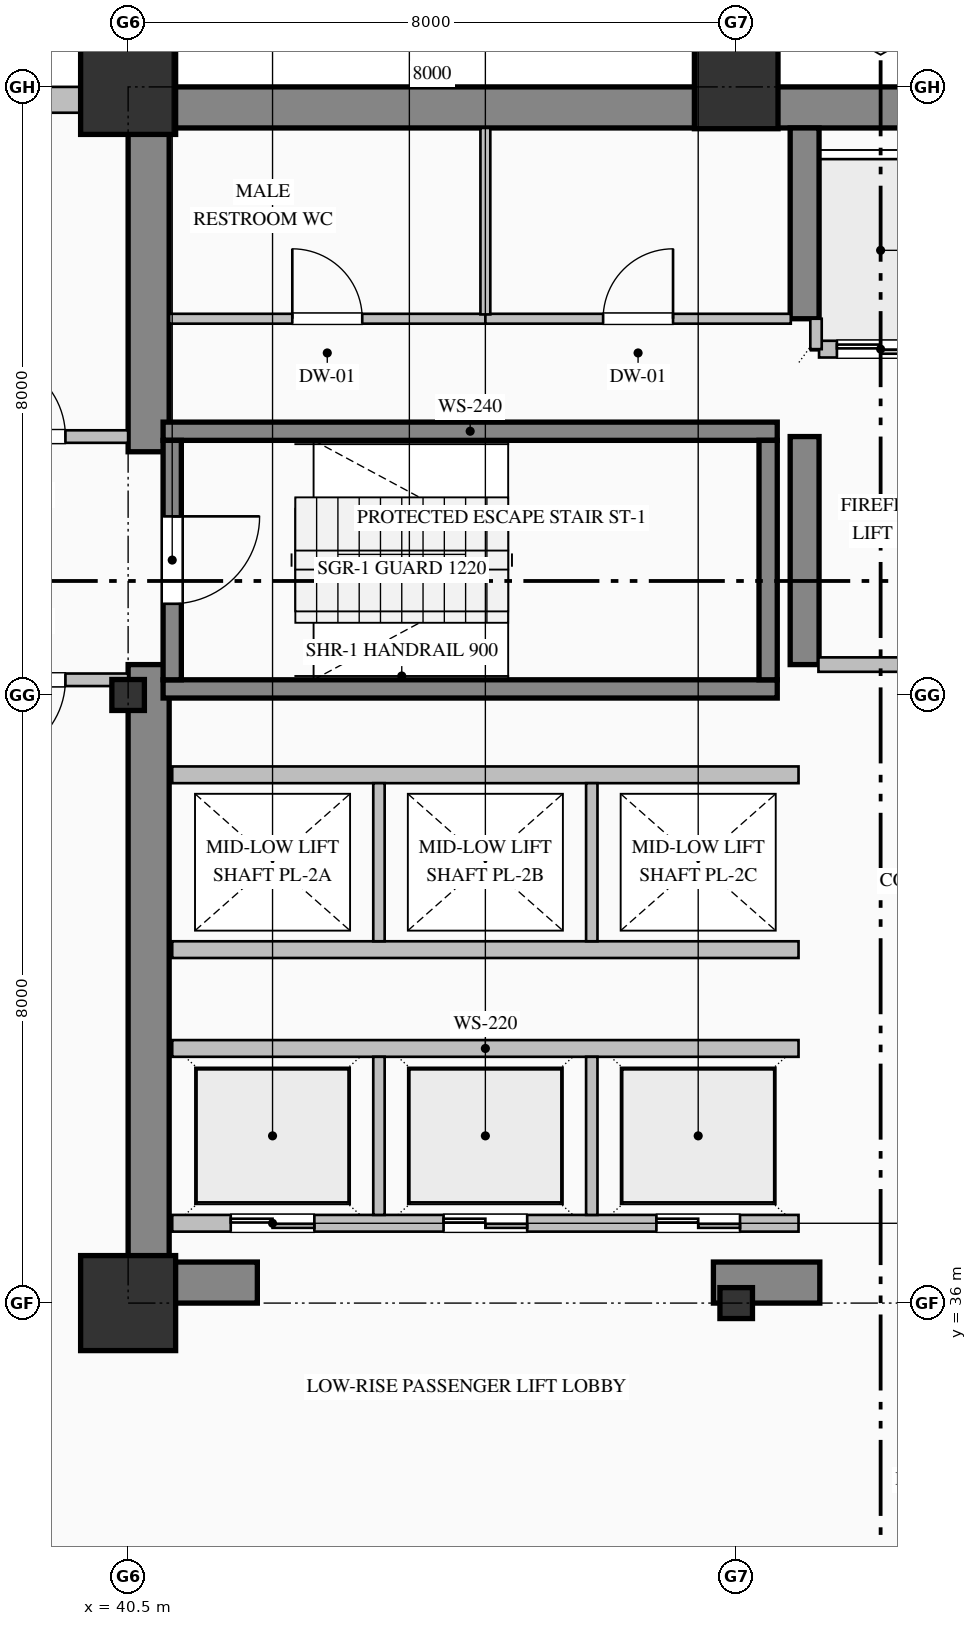
"""IFC4 building model, lengths in metres.
Left out: names, types, materials, properties, quantities, classifications, styles, units other than length and angle.
Written with IfcOpenShell. Run it as: python <this file> out.ifc"""

import sys

from ifc_helpers import new_model, si_unit, direction, frame, frame_2d, origin, origin_2d, place, context, subcontext, project, spatial, rectangle, hollow_rectangle, i_section, extrude, element, fill, save


model = new_model("IFC4")
c1 = context("Model", 3, precision=1e-05, world=origin(), true_north=direction((0.0, 1.0)))
c2 = subcontext(c1, "Body", "Model", "MODEL_VIEW")
j1 = project(units=[si_unit("LENGTHUNIT", "METRE"), si_unit("PLANEANGLEUNIT", "RADIAN")], contexts=[c1])
p1 = place(None, origin())
s1 = spatial("IfcSite", under=j1, at=p1, CompositionType="ELEMENT")
p2 = place(p1, origin())
s2 = spatial("IfcBuilding", under=s1, at=p2, CompositionType="ELEMENT")
p3 = place(p2, frame((0.0, 0.0, 68.2)))
s3 = spatial("IfcBuildingStorey", under=s2, at=p3, CompositionType="ELEMENT", Elevation=68.2)
p4 = place(p3, frame((40.5, 51.73, 0.0), z_axis=(0.0, 0.0, 1.0), x_axis=(1.0, 0.0, 0.0)))
e1 = element("IfcWall", 1, at=p4, inside=s3, PredefinedType="SHEAR", context=c2, shape_type="SweptSolid", body=[
    extrude(rectangle(XDim=23.5, YDim=0.54, at=frame_2d((11.75, 0.0))), origin(), (0.0, 0.0, 1.0), 3.75),
])
p5 = place(p3, frame((40.77, 36.54, 0.0), z_axis=(0.0, 0.0, 1.0), x_axis=(0.0, 1.0, 0.0)))
e2 = element("IfcWall", 2, at=p5, inside=s3, PredefinedType="SHEAR", context=c2, shape_type="SweptSolid", body=[
    extrude(rectangle(XDim=7.86, YDim=0.54, at=frame_2d((3.93, 0.0))), origin(), (0.0, 0.0, 1.0), 3.75),
])
p6 = place(p3, frame((40.77, 47.2, 0.0), z_axis=(0.0, 0.0, 1.0), x_axis=(0.0, 1.0, 0.0)))
e3 = element("IfcWall", 3, at=p6, inside=s3, PredefinedType="SHEAR", context=c2, shape_type="SweptSolid", body=[
    extrude(rectangle(XDim=4.26, YDim=0.54, at=frame_2d((2.13, 0.0))), origin(), (0.0, 0.0, 1.0), 3.75),
])
p7 = place(p3, frame((40.5, 36.27, 0.0), z_axis=(0.0, 0.0, 1.0), x_axis=(1.0, 0.0, 0.0)))
e4 = element("IfcWall", 4, at=p7, inside=s3, PredefinedType="SHEAR", context=c2, shape_type="SweptSolid", body=[
    extrude(rectangle(XDim=1.7, YDim=0.54, at=frame_2d((0.85, 0.0))), origin(), (0.0, 0.0, 1.0), 3.75),
])
p8 = place(p3, frame((48.2, 36.27, 0.0), z_axis=(0.0, 0.0, 1.0), x_axis=(1.0, 0.0, 0.0)))
e5 = element("IfcWall", 5, at=p8, inside=s3, PredefinedType="SHEAR", context=c2, shape_type="SweptSolid", body=[
    extrude(rectangle(XDim=1.4, YDim=0.54, at=frame_2d((0.7, 0.0))), origin(), (0.0, 0.0, 1.0), 3.75),
])
p9 = place(p3, frame((49.4, 44.4, 0.0), z_axis=(0.0, 0.0, 1.0), x_axis=(0.0, 1.0, 0.0)))
e6 = element("IfcWall", 6, at=p9, inside=s3, PredefinedType="SHEAR", context=c2, shape_type="SweptSolid", body=[
    extrude(rectangle(XDim=3.0, YDim=0.38, at=frame_2d((1.5, 0.0))), origin(), (0.0, 0.0, 1.0), 3.75),
])
p10 = place(p3, frame((49.4, 48.95, 0.0), z_axis=(0.0, 0.0, 1.0), x_axis=(0.0, 1.0, 0.0)))
e7 = element("IfcWall", 7, at=p10, inside=s3, PredefinedType="SHEAR", context=c2, shape_type="SweptSolid", body=[
    extrude(rectangle(XDim=2.51, YDim=0.38, at=frame_2d((1.255, 0.0))), origin(), (0.0, 0.0, 1.0), 3.75),
])
p11 = place(p3, frame((40.5, 36.0, 0.0), z_axis=(0.0, 0.0, 1.0), x_axis=(1.0, 0.0, 0.0)))
e8 = element("IfcColumn", 8, at=p11, inside=s3, PredefinedType="COLUMN", context=c2, shape_type="SweptSolid", body=[
    extrude(hollow_rectangle(XDim=1.25, YDim=1.25, WallThickness=0.045, at=origin_2d()), origin(), (0.0, 0.0, 1.0), 4.0),
])
p12 = place(p3, frame((40.5, 44.0, 0.0), z_axis=(0.0, 0.0, 1.0), x_axis=(1.0, 0.0, 0.0)))
e9 = element("IfcColumn", 9, at=p12, inside=s3, PredefinedType="COLUMN", context=c2, shape_type="SweptSolid", body=[
    extrude(i_section(OverallWidth=0.407, OverallDepth=0.428, WebThickness=0.02, FlangeThickness=0.035, FilletRadius=0.022, at=origin_2d()), origin(), (0.0, 0.0, 1.0), 4.0),
])
p13 = place(p3, frame((40.5, 52.0, 0.0), z_axis=(0.0, 0.0, 1.0), x_axis=(1.0, 0.0, 0.0)))
e10 = element("IfcColumn", 10, at=p13, inside=s3, PredefinedType="COLUMN", context=c2, shape_type="SweptSolid", body=[
    extrude(hollow_rectangle(XDim=1.25, YDim=1.25, WallThickness=0.045, at=origin_2d()), origin(), (0.0, 0.0, 1.0), 4.0),
])
p14 = place(p3, frame((48.5, 36.0, 0.0), z_axis=(0.0, 0.0, 1.0), x_axis=(1.0, 0.0, 0.0)))
e11 = element("IfcColumn", 11, at=p14, inside=s3, PredefinedType="COLUMN", context=c2, shape_type="SweptSolid", body=[
    extrude(i_section(OverallWidth=0.407, OverallDepth=0.428, WebThickness=0.02, FlangeThickness=0.035, FilletRadius=0.022, at=origin_2d()), origin(), (0.0, 0.0, 1.0), 4.0),
])
p15 = place(p3, frame((48.5, 52.0, 0.0), z_axis=(0.0, 0.0, 1.0), x_axis=(1.0, 0.0, 0.0)))
e12 = element("IfcColumn", 12, at=p15, inside=s3, PredefinedType="COLUMN", context=c2, shape_type="SweptSolid", body=[
    extrude(hollow_rectangle(XDim=1.1, YDim=1.1, WallThickness=0.04, at=origin_2d()), origin(), (0.0, 0.0, 1.0), 4.0),
])
p16 = place(p3, frame((4.0, 51.83, 0.0), z_axis=(0.0, 0.0, 1.0), x_axis=(1.0, 0.0, 0.0)))
e13 = element("IfcWall", 13, at=p16, inside=s3, PredefinedType="SOLIDWALL", context=c2, shape_type="SweptSolid", body=[
    extrude(rectangle(XDim=36.52, YDim=0.34, at=frame_2d((18.26, 0.0))), origin(), (0.0, 0.0, 1.0), 3.25),
])
p17 = place(p16, frame((6.15, 0.0, 0.85)))
e14 = element("IfcOpeningElement", 14, at=p17, cuts=e13, PredefinedType="OPENING", context=c2, shape_type="SweptSolid", body=[
    extrude(rectangle(XDim=2.1, YDim=2.05, at=frame_2d((1.05, 1.025))), frame((0.0, 0.18, 0.0), z_axis=(0.0, -1.0, 0.0), x_axis=(1.0, 0.0, 0.0)), (0.0, 0.0, 1.0), 0.36),
])
p18 = place(p16, frame((13.5, 0.0, 0.85)))
e15 = element("IfcOpeningElement", 15, at=p18, cuts=e13, PredefinedType="OPENING", context=c2, shape_type="SweptSolid", body=[
    extrude(rectangle(XDim=1.8, YDim=2.05, at=frame_2d((0.9, 1.025))), frame((0.0, 0.18, 0.0), z_axis=(0.0, -1.0, 0.0), x_axis=(1.0, 0.0, 0.0)), (0.0, 0.0, 1.0), 0.36),
])
p19 = place(p16, frame((16.95, 0.0, 0.85)))
e16 = element("IfcOpeningElement", 16, at=p19, cuts=e13, PredefinedType="OPENING", context=c2, shape_type="SweptSolid", body=[
    extrude(rectangle(XDim=2.1, YDim=2.05, at=frame_2d((1.05, 1.025))), frame((0.0, 0.18, 0.0), z_axis=(0.0, -1.0, 0.0), x_axis=(1.0, 0.0, 0.0)), (0.0, 0.0, 1.0), 0.36),
])
p20 = place(p16, frame((24.3, 0.0, 0.85)))
e17 = element("IfcOpeningElement", 17, at=p20, cuts=e13, PredefinedType="OPENING", context=c2, shape_type="SweptSolid", body=[
    extrude(rectangle(XDim=1.8, YDim=2.05, at=frame_2d((0.9, 1.025))), frame((0.0, 0.18, 0.0), z_axis=(0.0, -1.0, 0.0), x_axis=(1.0, 0.0, 0.0)), (0.0, 0.0, 1.0), 0.36),
])
for number, where, z_axis, x_axis in (
    (18, (40.96, 47.47, 0.0), (0.0, 0.0, 1.0), (1.0, 0.0, 0.0)),
    (19, (49.04, 44.08, 0.0), (0.0, 0.0, 1.0), (-1.0, 0.0, 0.0)),
):
    element("IfcWall", number, at=place(p3, frame(where, z_axis=z_axis, x_axis=x_axis)), inside=s3, PredefinedType="SOLIDWALL", context=c2, shape_type="SweptSolid", body=[
        extrude(rectangle(XDim=8.08, YDim=0.24, at=frame_2d((4.04, 0.0))), origin(), (0.0, 0.0, 1.0), 4.0),
    ])
p21 = place(p3, frame((41.08, 47.35, 0.0), z_axis=(0.0, 0.0, 1.0), x_axis=(0.0, -1.0, 0.0)))
e20 = element("IfcWall", 20, at=p21, inside=s3, PredefinedType="SOLIDWALL", context=c2, shape_type="SweptSolid", body=[
    extrude(rectangle(XDim=3.15, YDim=0.24, at=frame_2d((1.575, 0.0))), origin(), (0.0, 0.0, 1.0), 4.0),
])
p22 = place(p21, frame((1.0, 0.0, 0.0)))
e21 = element("IfcOpeningElement", 21, at=p22, cuts=e20, PredefinedType="OPENING", context=c2, shape_type="SweptSolid", body=[
    extrude(rectangle(XDim=1.15, YDim=2.2, at=frame_2d((0.575, 1.1))), frame((0.0, 0.13, 0.0), z_axis=(0.0, -1.0, 0.0), x_axis=(1.0, 0.0, 0.0)), (0.0, 0.0, 1.0), 0.26),
])
p23 = place(p3, frame((48.92, 44.2, 0.0), z_axis=(0.0, 0.0, 1.0), x_axis=(0.0, 1.0, 0.0)))
e22 = element("IfcWall", 22, at=p23, inside=s3, PredefinedType="SOLIDWALL", context=c2, shape_type="SweptSolid", body=[
    extrude(rectangle(XDim=3.15, YDim=0.24, at=frame_2d((1.575, 0.0))), origin(), (0.0, 0.0, 1.0), 4.0),
])
p24 = place(p3, frame((54.71, 48.55, 0.0), z_axis=(0.0, 0.0, 1.0), x_axis=(-1.0, 0.0, 0.0)))
e23 = element("IfcWall", 23, at=p24, inside=s3, PredefinedType="PARTITIONING", context=c2, shape_type="SweptSolid", body=[
    extrude(rectangle(XDim=5.12, YDim=0.22, at=frame_2d((2.56, 0.0))), origin(), (0.0, 0.0, 1.0), 3.75),
])
p25 = place(p24, frame((3.735, 0.0, 0.0)))
e24 = element("IfcOpeningElement", 24, at=p25, cuts=e23, PredefinedType="OPENING", context=c2, shape_type="SweptSolid", body=[
    extrude(rectangle(XDim=1.15, YDim=2.2, at=frame_2d((0.575, 1.1))), frame((0.0, 0.12, 0.0), z_axis=(0.0, -1.0, 0.0), x_axis=(1.0, 0.0, 0.0)), (0.0, 0.0, 1.0), 0.24),
])
p26 = place(p24, frame((0.935, 0.0, 0.0)))
e25 = element("IfcOpeningElement", 25, at=p26, cuts=e23, PredefinedType="OPENING", context=c2, shape_type="SweptSolid", body=[
    extrude(rectangle(XDim=1.15, YDim=2.2, at=frame_2d((0.575, 1.1))), frame((0.0, 0.12, 0.0), z_axis=(0.0, -1.0, 0.0), x_axis=(1.0, 0.0, 0.0)), (0.0, 0.0, 1.0), 0.24),
])
p27 = place(p3, frame((49.55, 48.55, 0.0), z_axis=(0.0, 0.0, 1.0), x_axis=(0.0, 1.0, 0.0)))
e26 = element("IfcWall", 26, at=p27, inside=s3, PredefinedType="PARTITIONING", context=c2, shape_type="SweptSolid", body=[
    extrude(rectangle(XDim=0.4, YDim=0.15, at=frame_2d((0.2, 0.0))), origin(), (0.0, 0.0, 1.0), 3.75),
])
p28 = place(p3, frame((49.32, 37.05, 0.0), z_axis=(0.0, 0.0, 1.0), x_axis=(-1.0, 0.0, 0.0)))
e27 = element("IfcWall", 27, at=p28, inside=s3, PredefinedType="PARTITIONING", context=c2, shape_type="SweptSolid", body=[
    extrude(rectangle(XDim=8.24, YDim=0.22, at=frame_2d((4.12, 0.0))), origin(), (0.0, 0.0, 1.0), 3.75),
])
p29 = place(p28, frame((6.37, 0.0, 0.0)))
e28 = element("IfcOpeningElement", 28, at=p29, cuts=e27, PredefinedType="OPENING", context=c2, shape_type="SweptSolid", body=[
    extrude(rectangle(XDim=1.1, YDim=2.2, at=frame_2d((0.55, 1.1))), frame((0.0, 0.12, 0.0), z_axis=(0.0, -1.0, 0.0), x_axis=(1.0, 0.0, 0.0)), (0.0, 0.0, 1.0), 0.24),
])
p30 = place(p28, frame((3.57, 0.0, 0.0)))
e29 = element("IfcOpeningElement", 29, at=p30, cuts=e27, PredefinedType="OPENING", context=c2, shape_type="SweptSolid", body=[
    extrude(rectangle(XDim=1.1, YDim=2.2, at=frame_2d((0.55, 1.1))), frame((0.0, 0.12, 0.0), z_axis=(0.0, -1.0, 0.0), x_axis=(1.0, 0.0, 0.0)), (0.0, 0.0, 1.0), 0.24),
])
p31 = place(p28, frame((0.77, 0.0, 0.0)))
e30 = element("IfcOpeningElement", 30, at=p31, cuts=e27, PredefinedType="OPENING", context=c2, shape_type="SweptSolid", body=[
    extrude(rectangle(XDim=1.1, YDim=2.2, at=frame_2d((0.55, 1.1))), frame((0.0, 0.12, 0.0), z_axis=(0.0, -1.0, 0.0), x_axis=(1.0, 0.0, 0.0)), (0.0, 0.0, 1.0), 0.24),
])
p32 = place(p3, frame((41.08, 39.35, 0.0), z_axis=(0.0, 0.0, 1.0), x_axis=(1.0, 0.0, 0.0)))
e31 = element("IfcWall", 31, at=p32, inside=s3, PredefinedType="PARTITIONING", context=c2, shape_type="SweptSolid", body=[
    extrude(rectangle(XDim=8.24, YDim=0.22, at=frame_2d((4.12, 0.0))), origin(), (0.0, 0.0, 1.0), 3.75),
])
for number, where, z_axis, x_axis in (
    (32, (43.8, 37.16, 0.0), (0.0, 0.0, 1.0), (0.0, 1.0, 0.0)),
    (33, (46.6, 37.16, 0.0), (0.0, 0.0, 1.0), (0.0, 1.0, 0.0)),
):
    element("IfcWall", number, at=place(p3, frame(where, z_axis=z_axis, x_axis=x_axis)), inside=s3, PredefinedType="PARTITIONING", context=c2, shape_type="SweptSolid", body=[
        extrude(rectangle(XDim=2.08, YDim=0.15, at=frame_2d((1.04, 0.0))), origin(), (0.0, 0.0, 1.0), 3.75),
    ])
for number, where, z_axis, x_axis in (
    (34, (49.32, 40.65, 0.0), (0.0, 0.0, 1.0), (-1.0, 0.0, 0.0)),
    (35, (41.08, 42.95, 0.0), (0.0, 0.0, 1.0), (1.0, 0.0, 0.0)),
):
    element("IfcWall", number, at=place(p3, frame(where, z_axis=z_axis, x_axis=x_axis)), inside=s3, PredefinedType="PARTITIONING", context=c2, shape_type="SweptSolid", body=[
        extrude(rectangle(XDim=8.24, YDim=0.22, at=frame_2d((4.12, 0.0))), origin(), (0.0, 0.0, 1.0), 3.75),
    ])
for number, where, z_axis, x_axis in (
    (36, (43.8, 40.76, 0.0), (0.0, 0.0, 1.0), (0.0, 1.0, 0.0)),
    (37, (46.6, 40.76, 0.0), (0.0, 0.0, 1.0), (0.0, 1.0, 0.0)),
):
    element("IfcWall", number, at=place(p3, frame(where, z_axis=z_axis, x_axis=x_axis)), inside=s3, PredefinedType="PARTITIONING", context=c2, shape_type="SweptSolid", body=[
        extrude(rectangle(XDim=2.08, YDim=0.15, at=frame_2d((1.04, 0.0))), origin(), (0.0, 0.0, 1.0), 3.75),
    ])
p33 = place(p3, frame((37.8, 47.4, 0.0), z_axis=(0.0, 0.0, 1.0), x_axis=(1.0, 0.0, 0.0)))
e38 = element("IfcWall", 38, at=p33, inside=s3, PredefinedType="PARTITIONING", context=c2, shape_type="SweptSolid", body=[
    extrude(rectangle(XDim=2.7, YDim=0.165, at=frame_2d((1.35, 0.0))), origin(), (0.0, 0.0, 1.0), 3.75),
])
p34 = place(p33, frame((0.825, 0.0, 0.0)))
e39 = element("IfcOpeningElement", 39, at=p34, cuts=e38, PredefinedType="OPENING", context=c2, shape_type="SweptSolid", body=[
    extrude(rectangle(XDim=1.05, YDim=2.15, at=frame_2d((0.525, 1.075))), frame((0.0, 0.093, 0.0), z_axis=(0.0, -1.0, 0.0), x_axis=(1.0, 0.0, 0.0)), (0.0, 0.0, 1.0), 0.185),
])
p35 = place(p3, frame((40.5, 44.2, 0.0), z_axis=(0.0, 0.0, 1.0), x_axis=(-1.0, 0.0, 0.0)))
e40 = element("IfcWall", 40, at=p35, inside=s3, PredefinedType="PARTITIONING", context=c2, shape_type="SweptSolid", body=[
    extrude(rectangle(XDim=2.7, YDim=0.165, at=frame_2d((1.35, 0.0))), origin(), (0.0, 0.0, 1.0), 3.75),
])
p36 = place(p35, frame((0.825, 0.0, 0.0)))
e41 = element("IfcOpeningElement", 41, at=p36, cuts=e40, PredefinedType="OPENING", context=c2, shape_type="SweptSolid", body=[
    extrude(rectangle(XDim=1.05, YDim=2.15, at=frame_2d((0.525, 1.075))), frame((0.0, 0.093, 0.0), z_axis=(0.0, -1.0, 0.0), x_axis=(1.0, 0.0, 0.0)), (0.0, 0.0, 1.0), 0.185),
])
p37 = place(p3, frame((41.04, 48.95, 0.0), z_axis=(0.0, 0.0, 1.0), x_axis=(1.0, 0.0, 0.0)))
e42 = element("IfcWall", 42, at=p37, inside=s3, PredefinedType="PARTITIONING", context=c2, shape_type="SweptSolid", body=[
    extrude(rectangle(XDim=4.16, YDim=0.13, at=frame_2d((2.08, 0.0))), origin(), (0.0, 0.0, 1.0), 3.75),
])
p38 = place(p37, frame((1.62, 0.0, 0.0)))
e43 = element("IfcOpeningElement", 43, at=p38, cuts=e42, PredefinedType="OPENING", context=c2, shape_type="SweptSolid", body=[
    extrude(rectangle(XDim=0.92, YDim=2.15, at=frame_2d((0.46, 1.075))), frame((0.0, 0.075, 0.0), z_axis=(0.0, -1.0, 0.0), x_axis=(1.0, 0.0, 0.0)), (0.0, 0.0, 1.0), 0.15),
])
p39 = place(p3, frame((45.2, 48.95, 0.0), z_axis=(0.0, 0.0, 1.0), x_axis=(1.0, 0.0, 0.0)))
e44 = element("IfcWall", 44, at=p39, inside=s3, PredefinedType="PARTITIONING", context=c2, shape_type="SweptSolid", body=[
    extrude(rectangle(XDim=4.018, YDim=0.13, at=frame_2d((2.009, 0.0))), origin(), (0.0, 0.0, 1.0), 3.75),
])
p40 = place(p39, frame((1.549, 0.0, 0.0)))
e45 = element("IfcOpeningElement", 45, at=p40, cuts=e44, PredefinedType="OPENING", context=c2, shape_type="SweptSolid", body=[
    extrude(rectangle(XDim=0.92, YDim=2.15, at=frame_2d((0.46, 1.075))), frame((0.0, 0.075, 0.0), z_axis=(0.0, -1.0, 0.0), x_axis=(1.0, 0.0, 0.0)), (0.0, 0.0, 1.0), 0.15),
])
p41 = place(p3, frame((54.718, 44.4, 0.0), z_axis=(0.0, 0.0, 1.0), x_axis=(-1.0, 0.0, 0.0)))
e46 = element("IfcWall", 46, at=p41, inside=s3, PredefinedType="PARTITIONING", context=c2, shape_type="SweptSolid", body=[
    extrude(rectangle(XDim=5.136, YDim=0.19, at=frame_2d((2.568, 0.0))), origin(), (0.0, 0.0, 1.0), 3.75),
])
p42 = place(p41, frame((2.043, 0.0, 0.0)))
e47 = element("IfcOpeningElement", 47, at=p42, cuts=e46, PredefinedType="OPENING", context=c2, shape_type="SweptSolid", body=[
    extrude(rectangle(XDim=1.05, YDim=2.15, at=frame_2d((0.525, 1.075))), frame((0.0, 0.105, 0.0), z_axis=(0.0, -1.0, 0.0), x_axis=(1.0, 0.0, 0.0)), (0.0, 0.0, 1.0), 0.21),
])
p43 = place(p3, frame((45.2, 51.46, 0.0), z_axis=(0.0, 0.0, 1.0), x_axis=(0.0, -1.0, 0.0)))
e48 = element("IfcWall", 48, at=p43, inside=s3, PredefinedType="PARTITIONING", context=c2, shape_type="SweptSolid", body=[
    extrude(rectangle(XDim=2.453, YDim=0.13, at=frame_2d((1.227, 0.0))), origin(), (0.0, 0.0, 1.0), 3.75),
])
p44 = place(p22, origin())
e49 = element("IfcDoor", 49, at=p44, inside=s3, OperationType="SINGLE_SWING_LEFT", PredefinedType="DOOR", context=c2, shape_type="SweptSolid", body=[
    extrude(rectangle(XDim=1.15, YDim=2.2, at=frame_2d((0.575, 1.1))), frame((0.0, 0.025, 0.0), z_axis=(0.0, -1.0, 0.0), x_axis=(1.0, 0.0, 0.0)), (0.0, 0.0, 1.0), 0.05),
])
fill(e21, e49)
p45 = place(p25, origin())
e50 = element("IfcDoor", 50, at=p45, inside=s3, OperationType="DOUBLE_DOOR_SLIDING", PredefinedType="DOOR", context=c2, shape_type="SweptSolid", body=[
    extrude(rectangle(XDim=1.15, YDim=2.2, at=frame_2d((0.575, 1.1))), frame((0.0, 0.025, 0.0), z_axis=(0.0, -1.0, 0.0), x_axis=(1.0, 0.0, 0.0)), (0.0, 0.0, 1.0), 0.05),
])
fill(e24, e50)
p46 = place(p29, origin())
e51 = element("IfcDoor", 51, at=p46, inside=s3, OperationType="DOUBLE_DOOR_SLIDING", PredefinedType="DOOR", context=c2, shape_type="SweptSolid", body=[
    extrude(rectangle(XDim=1.1, YDim=2.2, at=frame_2d((0.55, 1.1))), frame((0.0, 0.025, 0.0), z_axis=(0.0, -1.0, 0.0), x_axis=(1.0, 0.0, 0.0)), (0.0, 0.0, 1.0), 0.05),
])
fill(e28, e51)
p47 = place(p30, origin())
e52 = element("IfcDoor", 52, at=p47, inside=s3, OperationType="DOUBLE_DOOR_SLIDING", PredefinedType="DOOR", context=c2, shape_type="SweptSolid", body=[
    extrude(rectangle(XDim=1.1, YDim=2.2, at=frame_2d((0.55, 1.1))), frame((0.0, 0.025, 0.0), z_axis=(0.0, -1.0, 0.0), x_axis=(1.0, 0.0, 0.0)), (0.0, 0.0, 1.0), 0.05),
])
fill(e29, e52)
p48 = place(p31, origin())
e53 = element("IfcDoor", 53, at=p48, inside=s3, OperationType="DOUBLE_DOOR_SLIDING", PredefinedType="DOOR", context=c2, shape_type="SweptSolid", body=[
    extrude(rectangle(XDim=1.1, YDim=2.2, at=frame_2d((0.55, 1.1))), frame((0.0, 0.025, 0.0), z_axis=(0.0, -1.0, 0.0), x_axis=(1.0, 0.0, 0.0)), (0.0, 0.0, 1.0), 0.05),
])
fill(e30, e53)
p49 = place(p34, origin())
e54 = element("IfcDoor", 54, at=p49, inside=s3, OperationType="SINGLE_SWING_LEFT", PredefinedType="DOOR", context=c2, shape_type="SweptSolid", body=[
    extrude(rectangle(XDim=1.05, YDim=2.15, at=frame_2d((0.525, 1.075))), frame((0.0, 0.025, 0.0), z_axis=(0.0, -1.0, 0.0), x_axis=(1.0, 0.0, 0.0)), (0.0, 0.0, 1.0), 0.05),
])
fill(e39, e54)
p50 = place(p36, origin())
e55 = element("IfcDoor", 55, at=p50, inside=s3, OperationType="SINGLE_SWING_RIGHT", PredefinedType="DOOR", context=c2, shape_type="SweptSolid", body=[
    extrude(rectangle(XDim=1.05, YDim=2.15, at=frame_2d((0.525, 1.075))), frame((0.0, 0.025, 0.0), z_axis=(0.0, -1.0, 0.0), x_axis=(1.0, 0.0, 0.0)), (0.0, 0.0, 1.0), 0.05),
])
fill(e41, e55)
p51 = place(p38, origin())
e56 = element("IfcDoor", 56, at=p51, inside=s3, OperationType="SINGLE_SWING_LEFT", PredefinedType="DOOR", context=c2, shape_type="SweptSolid", body=[
    extrude(rectangle(XDim=0.92, YDim=2.15, at=frame_2d((0.46, 1.075))), frame((0.0, 0.025, 0.0), z_axis=(0.0, -1.0, 0.0), x_axis=(1.0, 0.0, 0.0)), (0.0, 0.0, 1.0), 0.05),
])
fill(e43, e56)
p52 = place(p40, origin())
e57 = element("IfcDoor", 57, at=p52, inside=s3, OperationType="SINGLE_SWING_RIGHT", PredefinedType="DOOR", context=c2, shape_type="SweptSolid", body=[
    extrude(rectangle(XDim=0.92, YDim=2.15, at=frame_2d((0.46, 1.075))), frame((0.0, 0.025, 0.0), z_axis=(0.0, -1.0, 0.0), x_axis=(1.0, 0.0, 0.0)), (0.0, 0.0, 1.0), 0.05),
])
fill(e45, e57)
save(model, sys.argv[1])
